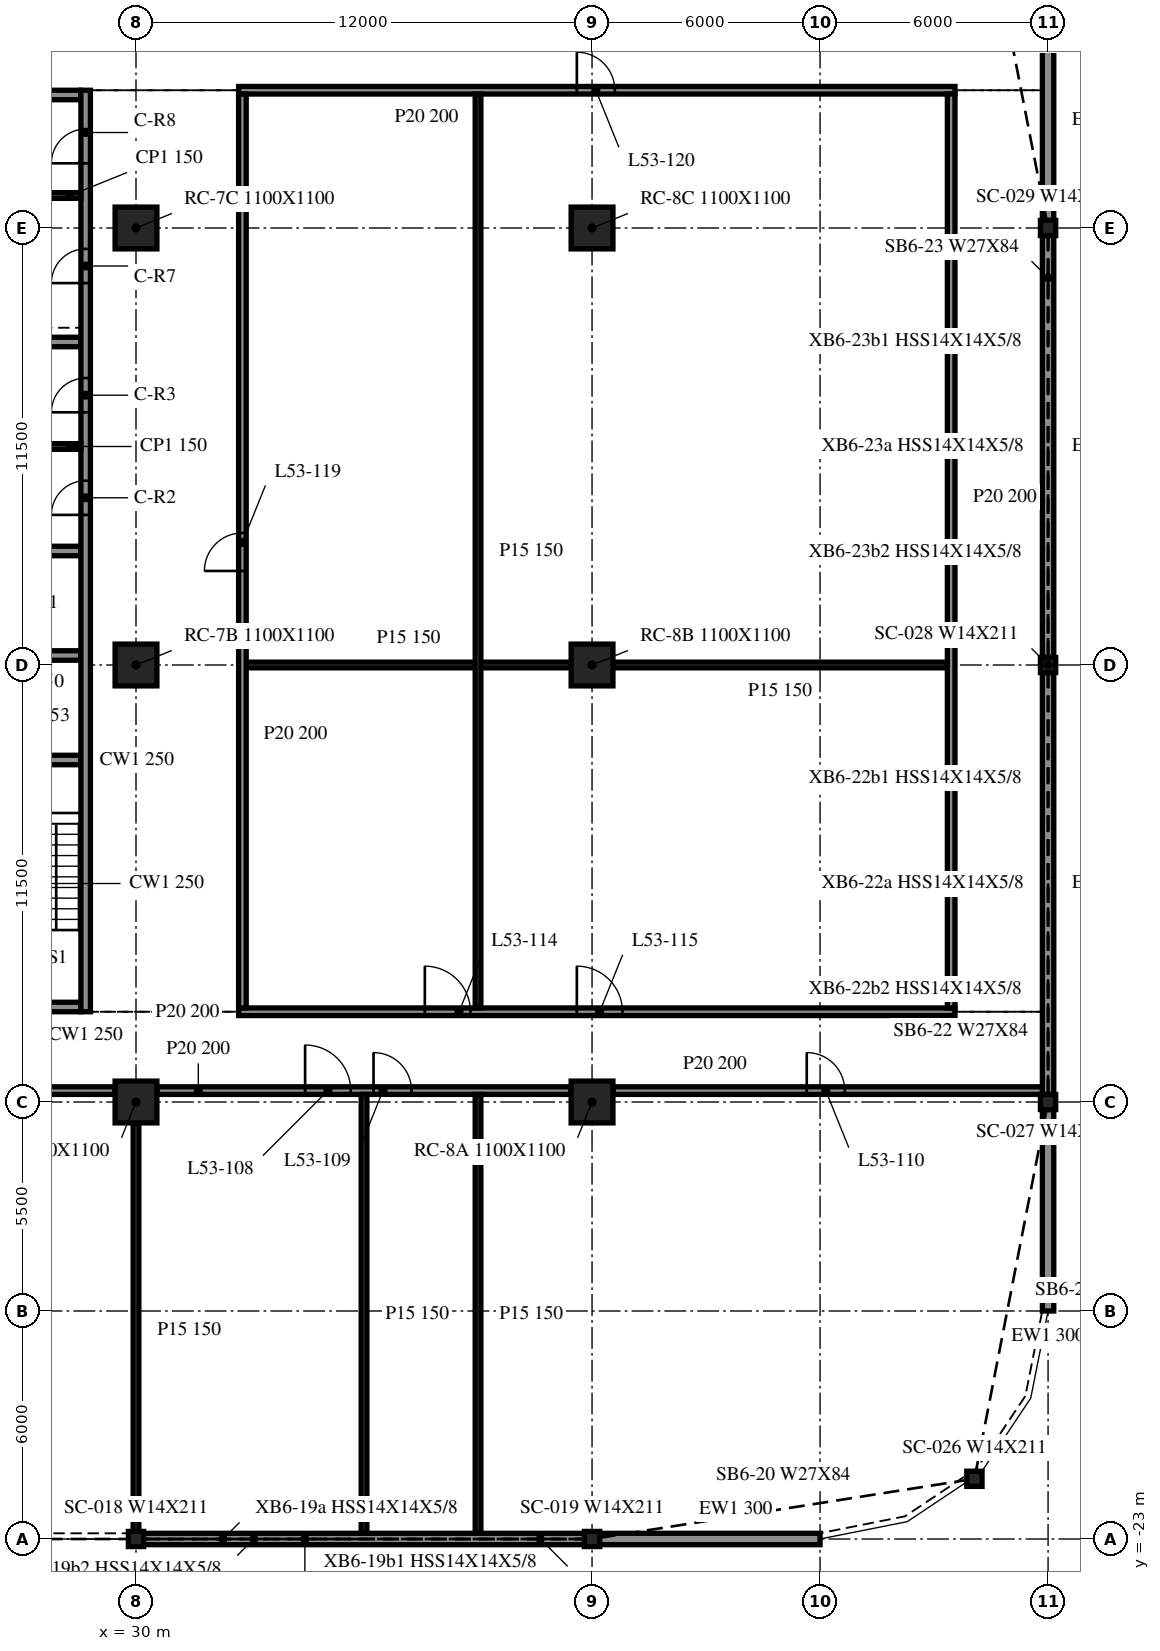
"""IFC4 building model, lengths in metres.
Left out: names, types, materials, properties, quantities, classifications, styles, units other than length and angle.
Written with IfcOpenShell. Run it as: python <this file> out.ifc"""

import sys

from ifc_helpers import new_model, si_unit, direction, frame, frame_2d, origin, origin_2d, place, context, subcontext, project, spatial, rectangle, i_section, extrude, element, fill, save


model = new_model("IFC4")
c1 = context("Model", 3, precision=1e-05, world=origin(), true_north=direction((0.0, 1.0)))
c2 = subcontext(c1, "Body", "Model", "MODEL_VIEW")
j1 = project(units=[si_unit("LENGTHUNIT", "METRE"), si_unit("PLANEANGLEUNIT", "RADIAN")], contexts=[c1])
p1 = place(None, origin())
s1 = spatial("IfcSite", under=j1, at=p1, CompositionType="ELEMENT")
p2 = place(p1, origin())
s2 = spatial("IfcBuilding", under=s1, at=p2, CompositionType="ELEMENT")
p3 = place(p2, frame((0.0, 0.0, 220.5)))
s3 = spatial("IfcBuildingStorey", under=s2, at=p3, CompositionType="ELEMENT", Elevation=220.5)
for number, where, z_axis, x_axis in (
    (1, (30.0, -11.5, -0.34), (0.0, 0.0, 1.0), (1.0, 0.0, 0.0)),
    (2, (30.0, 0.0, -0.34), (0.0, 0.0, 1.0), (1.0, 0.0, 0.0)),
    (3, (30.0, 11.5, -0.34), (0.0, 0.0, 1.0), (1.0, 0.0, 0.0)),
    (4, (42.0, -11.5, -0.34), (0.0, 0.0, 1.0), (1.0, 0.0, 0.0)),
    (5, (42.0, 0.0, -0.34), (0.0, 0.0, 1.0), (1.0, 0.0, 0.0)),
    (6, (42.0, 11.5, -0.34), (0.0, 0.0, 1.0), (1.0, 0.0, 0.0)),
):
    element("IfcColumn", number, at=place(p3, frame(where, z_axis=z_axis, x_axis=x_axis)), inside=s3, PredefinedType="COLUMN", context=c2, shape_type="SweptSolid", body=[
        extrude(rectangle(XDim=1.1, YDim=1.1, at=origin_2d()), origin(), (0.0, 0.0, 1.0), 3.74),
    ])
for number, where, z_axis, x_axis in (
    (7, (30.0, -23.0, -0.34), (0.0, 0.0, 1.0), (1.0, 0.0, 0.0)),
    (8, (42.0, -23.0, -0.34), (0.0, 0.0, 1.0), (1.0, 0.0, 0.0)),
    (9, (52.062, -21.416, -0.34), (0.0, 0.0, 1.0), (1.0, 0.0, 0.0)),
    (10, (54.0, -11.5, -0.34), (0.0, 0.0, 1.0), (1.0, 0.0, 0.0)),
    (11, (54.0, 0.0, -0.34), (0.0, 0.0, 1.0), (1.0, 0.0, 0.0)),
    (12, (54.0, 11.5, -0.34), (0.0, 0.0, 1.0), (1.0, 0.0, 0.0)),
):
    element("IfcColumn", number, at=place(p3, frame(where, z_axis=z_axis, x_axis=x_axis)), inside=s3, PredefinedType="COLUMN", context=c2, shape_type="SweptSolid", body=[
        extrude(i_section(OverallWidth=0.401, OverallDepth=0.399, WebThickness=0.025, FlangeThickness=0.04, at=origin_2d()), origin(), (0.0, 0.0, 1.0), 3.74),
    ])
p4 = place(p3, frame((30.012, -23.0, 0.0), z_axis=(0.0, 0.0, 1.0), x_axis=(1.0, 0.0, 0.0)))
e13 = element("IfcWall", 13, at=p4, inside=s3, PredefinedType="NOTDEFINED", context=c2, shape_type="SweptSolid", body=[
    extrude(rectangle(XDim=11.975, YDim=0.3, at=frame_2d((5.988, 0.0))), origin(), (0.0, 0.0, 1.0), 3.4),
])
p5 = place(p3, frame((42.012, -23.0, 0.0), z_axis=(0.0, 0.0, 1.0), x_axis=(1.0, 0.0, 0.0)))
e14 = element("IfcWall", 14, at=p5, inside=s3, PredefinedType="NOTDEFINED", context=c2, shape_type="SweptSolid", body=[
    extrude(rectangle(XDim=5.988, YDim=0.3, at=frame_2d((2.994, 0.0))), origin(), (0.0, 0.0, 1.0), 3.4),
])
p6 = place(p3, frame((54.0, -17.0, 0.0), z_axis=(0.0, 0.0, 1.0), x_axis=(0.0, 1.0, 0.0)))
e15 = element("IfcWall", 15, at=p6, inside=s3, PredefinedType="NOTDEFINED", context=c2, shape_type="SweptSolid", body=[
    extrude(rectangle(XDim=5.3, YDim=0.3, at=frame_2d((2.65, 0.0))), origin(), (0.0, 0.0, 1.0), 3.4),
])
for number, where, z_axis, x_axis in (
    (16, (54.0, -11.3, 0.0), (0.0, 0.0, 1.0), (0.0, 1.0, 0.0)),
    (17, (54.0, 0.2, 0.0), (0.0, 0.0, 1.0), (0.0, 1.0, 0.0)),
):
    element("IfcWall", number, at=place(p3, frame(where, z_axis=z_axis, x_axis=x_axis)), inside=s3, PredefinedType="NOTDEFINED", context=c2, shape_type="SweptSolid", body=[
        extrude(rectangle(XDim=11.1, YDim=0.3, at=frame_2d((5.55, 0.0))), origin(), (0.0, 0.0, 1.0), 3.4),
    ])
p7 = place(p3, frame((54.0, 11.7, 0.0), z_axis=(0.0, 0.0, 1.0), x_axis=(0.0, 1.0, 0.0)))
e18 = element("IfcWall", 18, at=p7, inside=s3, PredefinedType="NOTDEFINED", context=c2, shape_type="SweptSolid", body=[
    extrude(rectangle(XDim=5.3, YDim=0.3, at=frame_2d((2.65, 0.0))), origin(), (0.0, 0.0, 1.0), 3.4),
])
p8 = place(p3, frame((28.675, -9.125, 0.0), z_axis=(0.0, 0.0, 1.0), x_axis=(0.0, 1.0, 0.0)))
e19 = element("IfcWall", 19, at=p8, inside=s3, PredefinedType="SOLIDWALL", context=c2, shape_type="SweptSolid", body=[
    extrude(rectangle(XDim=24.25, YDim=0.25, at=frame_2d((12.125, 0.0))), origin(), (0.0, 0.0, 1.0), 3.4),
])
p9 = place(p8, frame((13.075, 0.0, 0.0)))
e20 = element("IfcOpeningElement", 20, at=p9, cuts=e19, PredefinedType="OPENING", context=c2, shape_type="SweptSolid", body=[
    extrude(rectangle(XDim=0.9, YDim=2.1, at=frame_2d((0.45, 1.05))), frame((0.0, 0.135, 0.0), z_axis=(0.0, -1.0, 0.0), x_axis=(1.0, 0.0, 0.0)), (0.0, 0.0, 1.0), 0.27),
])
p10 = place(p8, frame((15.775, 0.0, 0.0)))
e21 = element("IfcOpeningElement", 21, at=p10, cuts=e19, PredefinedType="OPENING", context=c2, shape_type="SweptSolid", body=[
    extrude(rectangle(XDim=0.9, YDim=2.1, at=frame_2d((0.45, 1.05))), frame((0.0, 0.135, 0.0), z_axis=(0.0, -1.0, 0.0), x_axis=(1.0, 0.0, 0.0)), (0.0, 0.0, 1.0), 0.27),
])
p11 = place(p8, frame((19.175, 0.0, 0.0)))
e22 = element("IfcOpeningElement", 22, at=p11, cuts=e19, PredefinedType="OPENING", context=c2, shape_type="SweptSolid", body=[
    extrude(rectangle(XDim=0.9, YDim=2.1, at=frame_2d((0.45, 1.05))), frame((0.0, 0.135, 0.0), z_axis=(0.0, -1.0, 0.0), x_axis=(1.0, 0.0, 0.0)), (0.0, 0.0, 1.0), 0.27),
])
p12 = place(p8, frame((22.327, 0.0, 0.0)))
e23 = element("IfcOpeningElement", 23, at=p12, cuts=e19, PredefinedType="OPENING", context=c2, shape_type="SweptSolid", body=[
    extrude(rectangle(XDim=0.9, YDim=2.1, at=frame_2d((0.45, 1.05))), frame((0.0, 0.135, 0.0), z_axis=(0.0, -1.0, 0.0), x_axis=(1.0, 0.0, 0.0)), (0.0, 0.0, 1.0), 0.27),
])
p13 = place(p3, frame((28.55, -9.0, 0.0), z_axis=(0.0, 0.0, 1.0), x_axis=(-1.0, 0.0, 0.0)))
e24 = element("IfcWall", 24, at=p13, inside=s3, PredefinedType="SOLIDWALL", context=c2, shape_type="SweptSolid", body=[
    extrude(rectangle(XDim=9.1, YDim=0.25, at=frame_2d((4.55, 0.0))), origin(), (0.0, 0.0, 1.0), 3.4),
])
p14 = place(p13, frame((3.65, 0.0, 0.0)))
e25 = element("IfcOpeningElement", 25, at=p14, cuts=e24, PredefinedType="OPENING", context=c2, shape_type="SweptSolid", body=[
    extrude(rectangle(XDim=1.8, YDim=2.1, at=frame_2d((0.9, 1.05))), frame((0.0, 0.135, 0.0), z_axis=(0.0, -1.0, 0.0), x_axis=(1.0, 0.0, 0.0)), (0.0, 0.0, 1.0), 0.27),
])
p15 = place(p3, frame((19.45, 15.0, 0.0), z_axis=(0.0, 0.0, 1.0), x_axis=(1.0, 0.0, 0.0)))
e26 = element("IfcWall", 26, at=p15, inside=s3, PredefinedType="SOLIDWALL", context=c2, shape_type="SweptSolid", body=[
    extrude(rectangle(XDim=9.1, YDim=0.25, at=frame_2d((4.55, 0.0))), origin(), (0.0, 0.0, 1.0), 3.4),
])
p16 = place(p15, frame((3.65, 0.0, 0.0)))
e27 = element("IfcOpeningElement", 27, at=p16, cuts=e26, PredefinedType="OPENING", context=c2, shape_type="SweptSolid", body=[
    extrude(rectangle(XDim=1.8, YDim=2.1, at=frame_2d((0.9, 1.05))), frame((0.0, 0.135, 0.0), z_axis=(0.0, -1.0, 0.0), x_axis=(1.0, 0.0, 0.0)), (0.0, 0.0, 1.0), 0.27),
])
for number, where, z_axis, x_axis in (
    (28, (25.7, -2.5, 0.0), (0.0, 0.0, 1.0), (1.0, 0.0, 0.0)),
    (29, (25.7, 0.25, 0.0), (0.0, 0.0, 1.0), (1.0, 0.0, 0.0)),
    (30, (25.7, 3.0, 0.0), (0.0, 0.0, 1.0), (1.0, 0.0, 0.0)),
    (31, (25.7, 8.5, 0.0), (0.0, 0.0, 1.0), (1.0, 0.0, 0.0)),
):
    element("IfcWall", number, at=place(p3, frame(where, z_axis=z_axis, x_axis=x_axis)), inside=s3, PredefinedType="SOLIDWALL", context=c2, shape_type="SweptSolid", body=[
        extrude(rectangle(XDim=2.85, YDim=0.25, at=frame_2d((1.425, 0.0))), origin(), (0.0, 0.0, 1.0), 3.4),
    ])
for number, where, z_axis, x_axis in (
    (32, (25.7, 5.75, 0.0), (0.0, 0.0, 1.0), (1.0, 0.0, 0.0)),
    (33, (25.7, 12.355, 0.0), (0.0, 0.0, 1.0), (1.0, 0.0, 0.0)),
):
    element("IfcWall", number, at=place(p3, frame(where, z_axis=z_axis, x_axis=x_axis)), inside=s3, PredefinedType="PARTITIONING", context=c2, shape_type="SweptSolid", body=[
        extrude(rectangle(XDim=2.85, YDim=0.15, at=frame_2d((1.425, 0.0))), origin(), (0.0, 0.0, 1.0), 3.4),
    ])
p17 = place(p3, frame((18.55, -11.2, 0.0), z_axis=(0.0, 0.0, 1.0), x_axis=(1.0, 0.0, 0.0)))
e34 = element("IfcWall", 34, at=p17, inside=s3, PredefinedType="PARTITIONING", context=c2, shape_type="SweptSolid", body=[
    extrude(rectangle(XDim=10.9, YDim=0.2, at=frame_2d((5.45, 0.0))), origin(), (0.0, 0.0, 1.0), 3.4),
])
p18 = place(p17, frame((4.9, 0.0, 0.0)))
e35 = element("IfcOpeningElement", 35, at=p18, cuts=e34, PredefinedType="OPENING", context=c2, shape_type="SweptSolid", body=[
    extrude(rectangle(XDim=1.0, YDim=2.1, at=frame_2d((0.5, 1.05))), frame((0.0, 0.11, 0.0), z_axis=(0.0, -1.0, 0.0), x_axis=(1.0, 0.0, 0.0)), (0.0, 0.0, 1.0), 0.22),
])
p19 = place(p3, frame((30.55, -11.2, 0.0), z_axis=(0.0, 0.0, 1.0), x_axis=(1.0, 0.0, 0.0)))
e36 = element("IfcWall", 36, at=p19, inside=s3, PredefinedType="PARTITIONING", context=c2, shape_type="SweptSolid", body=[
    extrude(rectangle(XDim=10.9, YDim=0.2, at=frame_2d((5.45, 0.0))), origin(), (0.0, 0.0, 1.0), 3.4),
])
p20 = place(p19, frame((3.9, 0.0, 0.0)))
e37 = element("IfcOpeningElement", 37, at=p20, cuts=e36, PredefinedType="OPENING", context=c2, shape_type="SweptSolid", body=[
    extrude(rectangle(XDim=1.2, YDim=2.1, at=frame_2d((0.6, 1.05))), frame((0.0, 0.11, 0.0), z_axis=(0.0, -1.0, 0.0), x_axis=(1.0, 0.0, 0.0)), (0.0, 0.0, 1.0), 0.22),
])
p21 = place(p19, frame((5.7, 0.0, 0.0)))
e38 = element("IfcOpeningElement", 38, at=p21, cuts=e36, PredefinedType="OPENING", context=c2, shape_type="SweptSolid", body=[
    extrude(rectangle(XDim=1.0, YDim=2.1, at=frame_2d((0.5, 1.05))), frame((0.0, 0.11, 0.0), z_axis=(0.0, -1.0, 0.0), x_axis=(1.0, 0.0, 0.0)), (0.0, 0.0, 1.0), 0.22),
])
p22 = place(p3, frame((42.55, -11.2, 0.0), z_axis=(0.0, 0.0, 1.0), x_axis=(1.0, 0.0, 0.0)))
e39 = element("IfcWall", 39, at=p22, inside=s3, PredefinedType="PARTITIONING", context=c2, shape_type="SweptSolid", body=[
    extrude(rectangle(XDim=11.3, YDim=0.2, at=frame_2d((5.65, 0.0))), origin(), (0.0, 0.0, 1.0), 3.4),
])
p23 = place(p22, frame((5.1, 0.0, 0.0)))
e40 = element("IfcOpeningElement", 40, at=p23, cuts=e39, PredefinedType="OPENING", context=c2, shape_type="SweptSolid", body=[
    extrude(rectangle(XDim=1.0, YDim=2.1, at=frame_2d((0.5, 1.05))), frame((0.0, 0.11, 0.0), z_axis=(0.0, -1.0, 0.0), x_axis=(1.0, 0.0, 0.0)), (0.0, 0.0, 1.0), 0.22),
])
p24 = place(p3, frame((32.7, -9.125, 0.0), z_axis=(0.0, 0.0, 1.0), x_axis=(1.0, 0.0, 0.0)))
e41 = element("IfcWall", 41, at=p24, inside=s3, PredefinedType="PARTITIONING", context=c2, shape_type="SweptSolid", body=[
    extrude(rectangle(XDim=18.85, YDim=0.2, at=frame_2d((9.425, 0.0))), origin(), (0.0, 0.0, 1.0), 3.4),
])
p25 = place(p24, frame((4.9, 0.0, 0.0)))
e42 = element("IfcOpeningElement", 42, at=p25, cuts=e41, PredefinedType="OPENING", context=c2, shape_type="SweptSolid", body=[
    extrude(rectangle(XDim=1.2, YDim=2.1, at=frame_2d((0.6, 1.05))), frame((0.0, 0.11, 0.0), z_axis=(0.0, -1.0, 0.0), x_axis=(1.0, 0.0, 0.0)), (0.0, 0.0, 1.0), 0.22),
])
p26 = place(p24, frame((8.9, 0.0, 0.0)))
e43 = element("IfcOpeningElement", 43, at=p26, cuts=e41, PredefinedType="OPENING", context=c2, shape_type="SweptSolid", body=[
    extrude(rectangle(XDim=1.2, YDim=2.1, at=frame_2d((0.6, 1.05))), frame((0.0, 0.11, 0.0), z_axis=(0.0, -1.0, 0.0), x_axis=(1.0, 0.0, 0.0)), (0.0, 0.0, 1.0), 0.22),
])
p27 = place(p3, frame((32.9, 0.0, 0.0), z_axis=(0.0, 0.0, 1.0), x_axis=(1.0, 0.0, 0.0)))
e44 = element("IfcWall", 44, at=p27, inside=s3, PredefinedType="PARTITIONING", context=c2, shape_type="SweptSolid", body=[
    extrude(rectangle(XDim=8.55, YDim=0.15, at=frame_2d((4.275, 0.0))), origin(), (0.0, 0.0, 1.0), 3.4),
])
p28 = place(p3, frame((42.55, 0.0, 0.0), z_axis=(0.0, 0.0, 1.0), x_axis=(1.0, 0.0, 0.0)))
e45 = element("IfcWall", 45, at=p28, inside=s3, PredefinedType="PARTITIONING", context=c2, shape_type="SweptSolid", body=[
    extrude(rectangle(XDim=8.8, YDim=0.15, at=frame_2d((4.4, 0.0))), origin(), (0.0, 0.0, 1.0), 3.4),
])
p29 = place(p3, frame((32.7, 15.125, 0.0), z_axis=(0.0, 0.0, 1.0), x_axis=(1.0, 0.0, 0.0)))
e46 = element("IfcWall", 46, at=p29, inside=s3, PredefinedType="PARTITIONING", context=c2, shape_type="SweptSolid", body=[
    extrude(rectangle(XDim=18.85, YDim=0.2, at=frame_2d((9.425, 0.0))), origin(), (0.0, 0.0, 1.0), 3.4),
])
p30 = place(p29, frame((8.9, 0.0, 0.0)))
e47 = element("IfcOpeningElement", 47, at=p30, cuts=e46, PredefinedType="OPENING", context=c2, shape_type="SweptSolid", body=[
    extrude(rectangle(XDim=1.0, YDim=2.1, at=frame_2d((0.5, 1.05))), frame((0.0, 0.11, 0.0), z_axis=(0.0, -1.0, 0.0), x_axis=(1.0, 0.0, 0.0)), (0.0, 0.0, 1.0), 0.22),
])
p31 = place(p3, frame((30.0, -22.975, 0.0), z_axis=(0.0, 0.0, 1.0), x_axis=(0.0, 1.0, 0.0)))
e48 = element("IfcWall", 48, at=p31, inside=s3, PredefinedType="PARTITIONING", context=c2, shape_type="SweptSolid", body=[
    extrude(rectangle(XDim=10.925, YDim=0.15, at=frame_2d((5.462, 0.0))), origin(), (0.0, 0.0, 1.0), 2.401),
])
p32 = place(p3, frame((32.8, -9.025, 0.0), z_axis=(0.0, 0.0, 1.0), x_axis=(0.0, 1.0, 0.0)))
e49 = element("IfcWall", 49, at=p32, inside=s3, PredefinedType="PARTITIONING", context=c2, shape_type="SweptSolid", body=[
    extrude(rectangle(XDim=24.05, YDim=0.2, at=frame_2d((12.025, 0.0))), origin(), (0.0, 0.0, 1.0), 3.4),
])
p33 = place(p32, frame((11.5, 0.0, 0.0)))
e50 = element("IfcOpeningElement", 50, at=p33, cuts=e49, PredefinedType="OPENING", context=c2, shape_type="SweptSolid", body=[
    extrude(rectangle(XDim=1.0, YDim=2.1, at=frame_2d((0.5, 1.05))), frame((0.0, 0.11, 0.0), z_axis=(0.0, -1.0, 0.0), x_axis=(1.0, 0.0, 0.0)), (0.0, 0.0, 1.0), 0.22),
])
for number, where, z_axis, x_axis in (
    (51, (36.0, -22.85, 0.0), (0.0, 0.0, 1.0), (0.0, 1.0, 0.0)),
    (52, (39.0, -22.85, 0.0), (0.0, 0.0, 1.0), (0.0, 1.0, 0.0)),
):
    element("IfcWall", number, at=place(p3, frame(where, z_axis=z_axis, x_axis=x_axis)), inside=s3, PredefinedType="PARTITIONING", context=c2, shape_type="SweptSolid", body=[
        extrude(rectangle(XDim=11.55, YDim=0.15, at=frame_2d((5.775, 0.0))), origin(), (0.0, 0.0, 1.0), 3.4),
    ])
p34 = place(p3, frame((39.0, -9.025, 0.0), z_axis=(0.0, 0.0, 1.0), x_axis=(0.0, 1.0, 0.0)))
e53 = element("IfcWall", 53, at=p34, inside=s3, PredefinedType="PARTITIONING", context=c2, shape_type="SweptSolid", body=[
    extrude(rectangle(XDim=24.05, YDim=0.15, at=frame_2d((12.025, 0.0))), origin(), (0.0, 0.0, 1.0), 3.4),
])
p35 = place(p3, frame((51.45, -9.025, 0.0), z_axis=(0.0, 0.0, 1.0), x_axis=(0.0, 1.0, 0.0)))
e54 = element("IfcWall", 54, at=p35, inside=s3, PredefinedType="PARTITIONING", context=c2, shape_type="SweptSolid", body=[
    extrude(rectangle(XDim=24.05, YDim=0.2, at=frame_2d((12.025, 0.0))), origin(), (0.0, 0.0, 1.0), 3.4),
])
p36 = place(p9, origin())
e55 = element("IfcDoor", 55, at=p36, inside=s3, OperationType="SINGLE_SWING_RIGHT", PredefinedType="DOOR", context=c2, shape_type="SweptSolid", body=[
    extrude(rectangle(XDim=0.9, YDim=2.1, at=frame_2d((0.45, 1.05))), frame((0.0, 0.025, 0.0), z_axis=(0.0, -1.0, 0.0), x_axis=(1.0, 0.0, 0.0)), (0.0, 0.0, 1.0), 0.05),
])
fill(e20, e55)
p37 = place(p10, origin())
e56 = element("IfcDoor", 56, at=p37, inside=s3, OperationType="SINGLE_SWING_LEFT", PredefinedType="DOOR", context=c2, shape_type="SweptSolid", body=[
    extrude(rectangle(XDim=0.9, YDim=2.1, at=frame_2d((0.45, 1.05))), frame((0.0, 0.025, 0.0), z_axis=(0.0, -1.0, 0.0), x_axis=(1.0, 0.0, 0.0)), (0.0, 0.0, 1.0), 0.05),
])
fill(e21, e56)
p38 = place(p11, origin())
e57 = element("IfcDoor", 57, at=p38, inside=s3, OperationType="SINGLE_SWING_LEFT", PredefinedType="DOOR", context=c2, shape_type="SweptSolid", body=[
    extrude(rectangle(XDim=0.9, YDim=2.1, at=frame_2d((0.45, 1.05))), frame((0.0, 0.025, 0.0), z_axis=(0.0, -1.0, 0.0), x_axis=(1.0, 0.0, 0.0)), (0.0, 0.0, 1.0), 0.05),
])
fill(e22, e57)
p39 = place(p12, origin())
e58 = element("IfcDoor", 58, at=p39, inside=s3, OperationType="SINGLE_SWING_RIGHT", PredefinedType="DOOR", context=c2, shape_type="SweptSolid", body=[
    extrude(rectangle(XDim=0.9, YDim=2.1, at=frame_2d((0.45, 1.05))), frame((0.0, 0.025, 0.0), z_axis=(0.0, -1.0, 0.0), x_axis=(1.0, 0.0, 0.0)), (0.0, 0.0, 1.0), 0.05),
])
fill(e23, e58)
p40 = place(p20, origin())
e59 = element("IfcDoor", 59, at=p40, inside=s3, OperationType="SINGLE_SWING_RIGHT", PredefinedType="DOOR", context=c2, shape_type="SweptSolid", body=[
    extrude(rectangle(XDim=1.2, YDim=2.1, at=frame_2d((0.6, 1.05))), frame((0.0, 0.025, 0.0), z_axis=(0.0, -1.0, 0.0), x_axis=(1.0, 0.0, 0.0)), (0.0, 0.0, 1.0), 0.05),
])
fill(e37, e59)
p41 = place(p21, origin())
e60 = element("IfcDoor", 60, at=p41, inside=s3, OperationType="SINGLE_SWING_LEFT", PredefinedType="DOOR", context=c2, shape_type="SweptSolid", body=[
    extrude(rectangle(XDim=1.0, YDim=2.1, at=frame_2d((0.5, 1.05))), frame((0.0, 0.025, 0.0), z_axis=(0.0, -1.0, 0.0), x_axis=(1.0, 0.0, 0.0)), (0.0, 0.0, 1.0), 0.05),
])
fill(e38, e60)
p42 = place(p23, origin())
e61 = element("IfcDoor", 61, at=p42, inside=s3, OperationType="SINGLE_SWING_RIGHT", PredefinedType="DOOR", context=c2, shape_type="SweptSolid", body=[
    extrude(rectangle(XDim=1.0, YDim=2.1, at=frame_2d((0.5, 1.05))), frame((0.0, 0.025, 0.0), z_axis=(0.0, -1.0, 0.0), x_axis=(1.0, 0.0, 0.0)), (0.0, 0.0, 1.0), 0.05),
])
fill(e40, e61)
p43 = place(p25, origin())
e62 = element("IfcDoor", 62, at=p43, inside=s3, OperationType="SINGLE_SWING_LEFT", PredefinedType="DOOR", context=c2, shape_type="SweptSolid", body=[
    extrude(rectangle(XDim=1.2, YDim=2.1, at=frame_2d((0.6, 1.05))), frame((0.0, 0.025, 0.0), z_axis=(0.0, -1.0, 0.0), x_axis=(1.0, 0.0, 0.0)), (0.0, 0.0, 1.0), 0.05),
])
fill(e42, e62)
p44 = place(p26, origin())
e63 = element("IfcDoor", 63, at=p44, inside=s3, OperationType="SINGLE_SWING_RIGHT", PredefinedType="DOOR", context=c2, shape_type="SweptSolid", body=[
    extrude(rectangle(XDim=1.2, YDim=2.1, at=frame_2d((0.6, 1.05))), frame((0.0, 0.025, 0.0), z_axis=(0.0, -1.0, 0.0), x_axis=(1.0, 0.0, 0.0)), (0.0, 0.0, 1.0), 0.05),
])
fill(e43, e63)
p45 = place(p33, origin())
e64 = element("IfcDoor", 64, at=p45, inside=s3, OperationType="SINGLE_SWING_RIGHT", PredefinedType="DOOR", context=c2, shape_type="SweptSolid", body=[
    extrude(rectangle(XDim=1.0, YDim=2.1, at=frame_2d((0.5, 1.05))), frame((0.0, 0.025, 0.0), z_axis=(0.0, -1.0, 0.0), x_axis=(1.0, 0.0, 0.0)), (0.0, 0.0, 1.0), 0.05),
])
fill(e50, e64)
p46 = place(p30, origin())
e65 = element("IfcDoor", 65, at=p46, inside=s3, OperationType="SINGLE_SWING_RIGHT", PredefinedType="DOOR", context=c2, shape_type="SweptSolid", body=[
    extrude(rectangle(XDim=1.0, YDim=2.1, at=frame_2d((0.5, 1.05))), frame((0.0, 0.025, 0.0), z_axis=(0.0, -1.0, 0.0), x_axis=(1.0, 0.0, 0.0)), (0.0, 0.0, 1.0), 0.05),
])
fill(e47, e65)
save(model, sys.argv[1])
